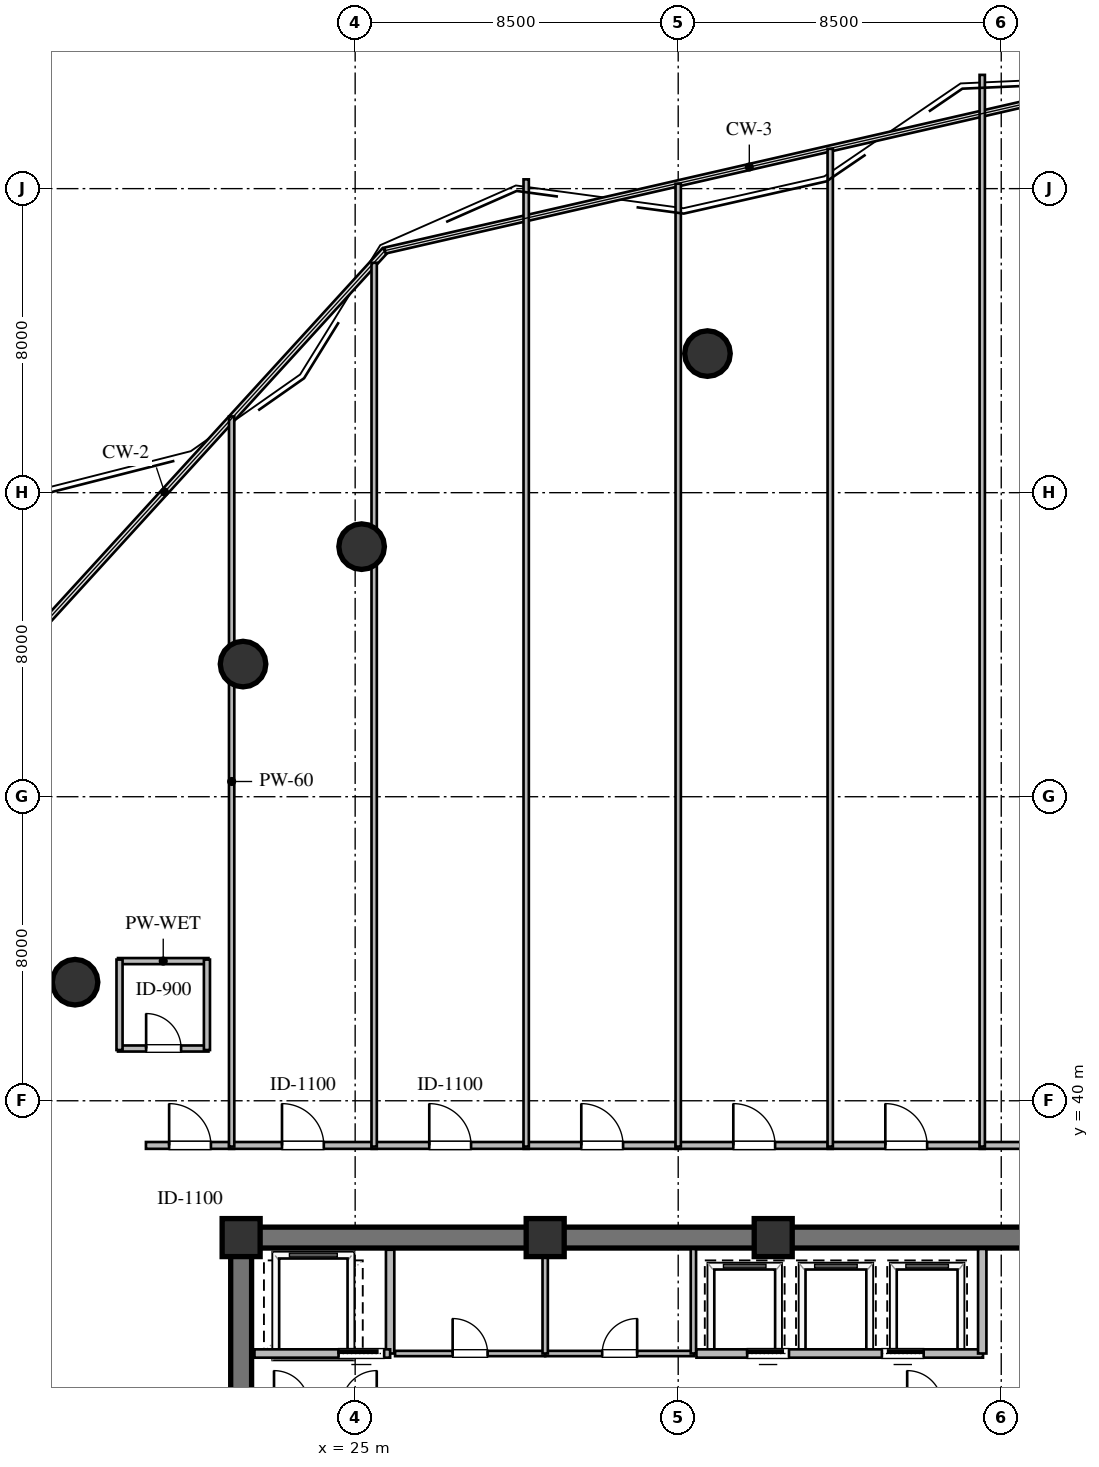
"""IFC4 building model, lengths in metres.
Left out: names, types, materials, properties, quantities, classifications, styles, units other than length and angle.
Written with IfcOpenShell. Run it as: python <this file> out.ifc"""

import sys

from ifc_helpers import new_model, si_unit, direction, frame, frame_2d, origin, origin_2d, place, context, subcontext, project, spatial, rectangle, circle, extrude, element, fill, save


model = new_model("IFC4")
c1 = context("Model", 3, precision=1e-05, world=origin(), true_north=direction((0.0, 1.0)))
c2 = subcontext(c1, "Body", "Model", "MODEL_VIEW")
j1 = project(units=[si_unit("LENGTHUNIT", "METRE"), si_unit("PLANEANGLEUNIT", "RADIAN")], contexts=[c1])
p1 = place(None, origin())
s1 = spatial("IfcSite", under=j1, at=p1, CompositionType="ELEMENT")
p2 = place(p1, origin())
s2 = spatial("IfcBuilding", under=s1, at=p2, CompositionType="ELEMENT")
p3 = place(p2, frame((0.0, 0.0, 167.4)))
s3 = spatial("IfcBuildingStorey", under=s2, at=p3, CompositionType="ELEMENT", Elevation=167.4)
p4 = place(p3, frame((21.725, 36.4, 0.0), z_axis=(0.0, 0.0, 1.0), x_axis=(1.0, 0.0, 0.0)))
e1 = element("IfcWall", 1, at=p4, inside=s3, PredefinedType="SHEAR", context=c2, shape_type="SweptSolid", body=[
    extrude(rectangle(XDim=22.55, YDim=0.55, at=frame_2d((11.275, 0.0))), origin(), (0.0, 0.0, 1.0), 3.36),
])
p5 = place(p3, frame((22.0, 23.875, 0.0), z_axis=(0.0, 0.0, 1.0), x_axis=(0.0, 1.0, 0.0)))
e2 = element("IfcWall", 2, at=p5, inside=s3, PredefinedType="SHEAR", context=c2, shape_type="SweptSolid", body=[
    extrude(rectangle(XDim=12.25, YDim=0.55, at=frame_2d((6.125, 0.0))), origin(), (0.0, 0.0, 1.0), 3.36),
])
for number, where, z_axis, x_axis in (
    (3, (36.0, 36.4, 0.0), (0.0, 0.0, 1.0), (1.0, 0.0, 0.0)),
    (4, (30.0, 36.4, 0.0), (0.0, 0.0, 1.0), (1.0, 0.0, 0.0)),
    (5, (22.0, 36.4, 0.0), (0.0, 0.0, 1.0), (1.0, 0.0, 0.0)),
):
    element("IfcColumn", number, at=place(p3, frame(where, z_axis=z_axis, x_axis=x_axis)), inside=s3, PredefinedType="COLUMN", context=c2, shape_type="SweptSolid", body=[
        extrude(rectangle(XDim=1.0, YDim=1.0, at=origin_2d()), origin(), (0.0, 0.0, 1.0), 3.6),
    ])
for number, where, z_axis, x_axis in (
    (6, (34.27, 59.66, 0.0), (0.0, 0.0, 1.0), (1.0, 0.0, 0.0)),
    (7, (25.17, 54.58, 0.0), (0.0, 0.0, 1.0), (1.0, 0.0, 0.0)),
    (8, (22.05, 51.49, 0.0), (0.0, 0.0, 1.0), (1.0, 0.0, 0.0)),
    (9, (17.63, 43.12, 0.0), (0.0, 0.0, 1.0), (1.0, 0.0, 0.0)),
):
    element("IfcColumn", number, at=place(p3, frame(where, z_axis=z_axis, x_axis=x_axis)), inside=s3, PredefinedType="COLUMN", context=c2, shape_type="SweptSolid", body=[
        extrude(circle(Radius=0.6, at=origin_2d()), origin(), (0.0, 0.0, 1.0), 3.6),
    ])
p6 = place(p3, frame((25.92, 33.35, 0.0), z_axis=(0.0, 0.0, 1.0), x_axis=(0.0, 1.0, 0.0)))
e10 = element("IfcWall", 10, at=p6, inside=s3, PredefinedType="SOLIDWALL", context=c2, shape_type="SweptSolid", body=[
    extrude(rectangle(XDim=2.73, YDim=0.22, at=frame_2d((1.365, 0.0))), origin(), (0.0, 0.0, 1.0), 3.36),
])
p7 = place(p3, frame((22.35, 33.35, 0.0), z_axis=(0.0, 0.0, 1.0), x_axis=(1.0, 0.0, 0.0)))
e11 = element("IfcWall", 11, at=p7, inside=s3, PredefinedType="SOLIDWALL", context=c2, shape_type="SweptSolid", body=[
    extrude(rectangle(XDim=3.57, YDim=0.22, at=frame_2d((1.785, 0.0))), origin(), (0.0, 0.0, 1.0), 3.36),
])
p8 = place(p7, frame((2.213, 0.0, 0.0)))
e12 = element("IfcOpeningElement", 12, at=p8, cuts=e11, PredefinedType="OPENING", context=c2, shape_type="SweptSolid", body=[
    extrude(rectangle(XDim=1.2, YDim=2.1, at=frame_2d((0.6, 1.05))), frame((0.0, 0.12, 0.0), z_axis=(0.0, -1.0, 0.0), x_axis=(1.0, 0.0, 0.0)), (0.0, 0.0, 1.0), 0.24),
])
p9 = place(p3, frame((26.05, 33.35, 0.0), z_axis=(0.0, 0.0, 1.0), x_axis=(1.0, 0.0, 0.0)))
e13 = element("IfcWall", 13, at=p9, inside=s3, PredefinedType="PARTITIONING", context=c2, shape_type="SweptSolid", body=[
    extrude(rectangle(XDim=3.95, YDim=0.14, at=frame_2d((1.975, 0.0))), origin(), (0.0, 0.0, 1.0), 3.36),
])
p10 = place(p9, frame((1.515, 0.0, 0.0)))
e14 = element("IfcOpeningElement", 14, at=p10, cuts=e13, PredefinedType="OPENING", context=c2, shape_type="SweptSolid", body=[
    extrude(rectangle(XDim=0.92, YDim=2.1, at=frame_2d((0.46, 1.05))), frame((0.0, 0.08, 0.0), z_axis=(0.0, -1.0, 0.0), x_axis=(1.0, 0.0, 0.0)), (0.0, 0.0, 1.0), 0.16),
])
p11 = place(p3, frame((30.0, 33.35, 0.0), z_axis=(0.0, 0.0, 1.0), x_axis=(1.0, 0.0, 0.0)))
e15 = element("IfcWall", 15, at=p11, inside=s3, PredefinedType="PARTITIONING", context=c2, shape_type="SweptSolid", body=[
    extrude(rectangle(XDim=3.92, YDim=0.14, at=frame_2d((1.96, 0.0))), origin(), (0.0, 0.0, 1.0), 3.36),
])
p12 = place(p11, frame((1.5, 0.0, 0.0)))
e16 = element("IfcOpeningElement", 16, at=p12, cuts=e15, PredefinedType="OPENING", context=c2, shape_type="SweptSolid", body=[
    extrude(rectangle(XDim=0.92, YDim=2.1, at=frame_2d((0.46, 1.05))), frame((0.0, 0.08, 0.0), z_axis=(0.0, -1.0, 0.0), x_axis=(1.0, 0.0, 0.0)), (0.0, 0.0, 1.0), 0.16),
])
for number, where, z_axis, x_axis in (
    (17, (30.0, 33.35, 0.0), (0.0, 0.0, 1.0), (0.0, 1.0, 0.0)),
    (18, (33.9, 33.35, 0.0), (0.0, 0.0, 1.0), (0.0, 1.0, 0.0)),
):
    element("IfcWall", number, at=place(p3, frame(where, z_axis=z_axis, x_axis=x_axis)), inside=s3, PredefinedType="PARTITIONING", context=c2, shape_type="SweptSolid", body=[
        extrude(rectangle(XDim=2.75, YDim=0.14, at=frame_2d((1.375, 0.0))), origin(), (0.0, 0.0, 1.0), 3.36),
    ])
p13 = place(p3, frame((33.98, 33.35, 0.0), z_axis=(0.0, 0.0, 1.0), x_axis=(1.0, 0.0, 0.0)))
e19 = element("IfcWall", 19, at=p13, inside=s3, PredefinedType="SOLIDWALL", context=c2, shape_type="SweptSolid", body=[
    extrude(rectangle(XDim=7.54, YDim=0.22, at=frame_2d((3.77, 0.0))), origin(), (0.0, 0.0, 1.0), 3.36),
])
p14 = place(p13, frame((1.335, 0.0, 0.0)))
e20 = element("IfcOpeningElement", 20, at=p14, cuts=e19, PredefinedType="OPENING", context=c2, shape_type="SweptSolid", body=[
    extrude(rectangle(XDim=1.1, YDim=2.1, at=frame_2d((0.55, 1.05))), frame((0.0, 0.12, 0.0), z_axis=(0.0, -1.0, 0.0), x_axis=(1.0, 0.0, 0.0)), (0.0, 0.0, 1.0), 0.24),
])
p15 = place(p13, frame((4.879, 0.0, 0.0)))
e21 = element("IfcOpeningElement", 21, at=p15, cuts=e19, PredefinedType="OPENING", context=c2, shape_type="SweptSolid", body=[
    extrude(rectangle(XDim=1.1, YDim=2.1, at=frame_2d((0.55, 1.05))), frame((0.0, 0.12, 0.0), z_axis=(0.0, -1.0, 0.0), x_axis=(1.0, 0.0, 0.0)), (0.0, 0.0, 1.0), 0.24),
])
p16 = place(p3, frame((41.5, 33.35, 0.0), z_axis=(0.0, 0.0, 1.0), x_axis=(0.0, 1.0, 0.0)))
e22 = element("IfcWall", 22, at=p16, inside=s3, PredefinedType="SOLIDWALL", context=c2, shape_type="SweptSolid", body=[
    extrude(rectangle(XDim=2.75, YDim=0.22, at=frame_2d((1.375, 0.0))), origin(), (0.0, 0.0, 1.0), 3.36),
])
p17 = place(p3, frame((18.76, 41.375, 0.0), z_axis=(0.0, 0.0, 1.0), x_axis=(1.0, 0.0, 0.0)))
e23 = element("IfcWall", 23, at=p17, inside=s3, PredefinedType="PLUMBINGWALL", context=c2, shape_type="SweptSolid", body=[
    extrude(rectangle(XDim=2.38, YDim=0.16, at=frame_2d((1.19, 0.0))), origin(), (0.0, 0.0, 1.0), 3.36),
])
p18 = place(p17, frame((0.74, 0.0, 0.0)))
e24 = element("IfcOpeningElement", 24, at=p18, cuts=e23, PredefinedType="OPENING", context=c2, shape_type="SweptSolid", body=[
    extrude(rectangle(XDim=0.92, YDim=2.1, at=frame_2d((0.46, 1.05))), frame((0.0, 0.09, 0.0), z_axis=(0.0, -1.0, 0.0), x_axis=(1.0, 0.0, 0.0)), (0.0, 0.0, 1.0), 0.18),
])
p19 = place(p3, frame((18.76, 43.675, 0.0), z_axis=(0.0, 0.0, 1.0), x_axis=(1.0, 0.0, 0.0)))
e25 = element("IfcWall", 25, at=p19, inside=s3, PredefinedType="PLUMBINGWALL", context=c2, shape_type="SweptSolid", body=[
    extrude(rectangle(XDim=2.38, YDim=0.16, at=frame_2d((1.19, 0.0))), origin(), (0.0, 0.0, 1.0), 3.36),
])
for number, where, z_axis, x_axis in (
    (26, (18.8, 41.335, 0.0), (0.0, 0.0, 1.0), (0.0, 1.0, 0.0)),
    (27, (21.1, 41.335, 0.0), (0.0, 0.0, 1.0), (0.0, 1.0, 0.0)),
):
    element("IfcWall", number, at=place(p3, frame(where, z_axis=z_axis, x_axis=x_axis)), inside=s3, PredefinedType="PLUMBINGWALL", context=c2, shape_type="SweptSolid", body=[
        extrude(rectangle(XDim=2.38, YDim=0.16, at=frame_2d((1.19, 0.0))), origin(), (0.0, 0.0, 1.0), 3.36),
    ])
p20 = place(p3, frame((19.495, 38.825, 0.0), z_axis=(0.0, 0.0, 1.0), x_axis=(1.0, 0.0, 0.0)))
e28 = element("IfcWall", 28, at=p20, inside=s3, PredefinedType="PARTITIONING", context=c2, shape_type="SweptSolid", body=[
    extrude(rectangle(XDim=2.32, YDim=0.18, at=frame_2d((1.16, 0.0))), origin(), (0.0, 0.0, 1.0), 3.36),
])
p21 = place(p20, frame((0.61, 0.0, 0.0)))
e29 = element("IfcOpeningElement", 29, at=p21, cuts=e28, PredefinedType="OPENING", context=c2, shape_type="SweptSolid", body=[
    extrude(rectangle(XDim=1.1, YDim=2.1, at=frame_2d((0.55, 1.05))), frame((0.0, 0.1, 0.0), z_axis=(0.0, -1.0, 0.0), x_axis=(1.0, 0.0, 0.0)), (0.0, 0.0, 1.0), 0.2),
])
p22 = place(p3, frame((21.685, 38.825, 0.0), z_axis=(0.0, 0.0, 1.0), x_axis=(1.0, 0.0, 0.0)))
e30 = element("IfcWall", 30, at=p22, inside=s3, PredefinedType="PARTITIONING", context=c2, shape_type="SweptSolid", body=[
    extrude(rectangle(XDim=3.88, YDim=0.18, at=frame_2d((1.94, 0.0))), origin(), (0.0, 0.0, 1.0), 3.36),
])
p23 = place(p22, frame((1.39, 0.0, 0.0)))
e31 = element("IfcOpeningElement", 31, at=p23, cuts=e30, PredefinedType="OPENING", context=c2, shape_type="SweptSolid", body=[
    extrude(rectangle(XDim=1.1, YDim=2.1, at=frame_2d((0.55, 1.05))), frame((0.0, 0.1, 0.0), z_axis=(0.0, -1.0, 0.0), x_axis=(1.0, 0.0, 0.0)), (0.0, 0.0, 1.0), 0.2),
])
p24 = place(p3, frame((25.435, 38.825, 0.0), z_axis=(0.0, 0.0, 1.0), x_axis=(1.0, 0.0, 0.0)))
e32 = element("IfcWall", 32, at=p24, inside=s3, PredefinedType="PARTITIONING", context=c2, shape_type="SweptSolid", body=[
    extrude(rectangle(XDim=4.13, YDim=0.18, at=frame_2d((2.065, 0.0))), origin(), (0.0, 0.0, 1.0), 3.36),
])
p25 = place(p24, frame((1.515, 0.0, 0.0)))
e33 = element("IfcOpeningElement", 33, at=p25, cuts=e32, PredefinedType="OPENING", context=c2, shape_type="SweptSolid", body=[
    extrude(rectangle(XDim=1.1, YDim=2.1, at=frame_2d((0.55, 1.05))), frame((0.0, 0.1, 0.0), z_axis=(0.0, -1.0, 0.0), x_axis=(1.0, 0.0, 0.0)), (0.0, 0.0, 1.0), 0.2),
])
p26 = place(p3, frame((29.435, 38.825, 0.0), z_axis=(0.0, 0.0, 1.0), x_axis=(1.0, 0.0, 0.0)))
e34 = element("IfcWall", 34, at=p26, inside=s3, PredefinedType="PARTITIONING", context=c2, shape_type="SweptSolid", body=[
    extrude(rectangle(XDim=4.13, YDim=0.18, at=frame_2d((2.065, 0.0))), origin(), (0.0, 0.0, 1.0), 3.36),
])
p27 = place(p26, frame((1.515, 0.0, 0.0)))
e35 = element("IfcOpeningElement", 35, at=p27, cuts=e34, PredefinedType="OPENING", context=c2, shape_type="SweptSolid", body=[
    extrude(rectangle(XDim=1.1, YDim=2.1, at=frame_2d((0.55, 1.05))), frame((0.0, 0.1, 0.0), z_axis=(0.0, -1.0, 0.0), x_axis=(1.0, 0.0, 0.0)), (0.0, 0.0, 1.0), 0.2),
])
p28 = place(p3, frame((33.435, 38.825, 0.0), z_axis=(0.0, 0.0, 1.0), x_axis=(1.0, 0.0, 0.0)))
e36 = element("IfcWall", 36, at=p28, inside=s3, PredefinedType="PARTITIONING", context=c2, shape_type="SweptSolid", body=[
    extrude(rectangle(XDim=4.13, YDim=0.18, at=frame_2d((2.065, 0.0))), origin(), (0.0, 0.0, 1.0), 3.36),
])
p29 = place(p28, frame((1.515, 0.0, 0.0)))
e37 = element("IfcOpeningElement", 37, at=p29, cuts=e36, PredefinedType="OPENING", context=c2, shape_type="SweptSolid", body=[
    extrude(rectangle(XDim=1.1, YDim=2.1, at=frame_2d((0.55, 1.05))), frame((0.0, 0.1, 0.0), z_axis=(0.0, -1.0, 0.0), x_axis=(1.0, 0.0, 0.0)), (0.0, 0.0, 1.0), 0.2),
])
p30 = place(p3, frame((37.435, 38.825, 0.0), z_axis=(0.0, 0.0, 1.0), x_axis=(1.0, 0.0, 0.0)))
e38 = element("IfcWall", 38, at=p30, inside=s3, PredefinedType="PARTITIONING", context=c2, shape_type="SweptSolid", body=[
    extrude(rectangle(XDim=4.13, YDim=0.18, at=frame_2d((2.065, 0.0))), origin(), (0.0, 0.0, 1.0), 3.36),
])
p31 = place(p30, frame((1.515, 0.0, 0.0)))
e39 = element("IfcOpeningElement", 39, at=p31, cuts=e38, PredefinedType="OPENING", context=c2, shape_type="SweptSolid", body=[
    extrude(rectangle(XDim=1.1, YDim=2.1, at=frame_2d((0.55, 1.05))), frame((0.0, 0.1, 0.0), z_axis=(0.0, -1.0, 0.0), x_axis=(1.0, 0.0, 0.0)), (0.0, 0.0, 1.0), 0.2),
])
p32 = place(p3, frame((41.435, 38.825, 0.0), z_axis=(0.0, 0.0, 1.0), x_axis=(1.0, 0.0, 0.0)))
e40 = element("IfcWall", 40, at=p32, inside=s3, PredefinedType="PARTITIONING", context=c2, shape_type="SweptSolid", body=[
    extrude(rectangle(XDim=4.38, YDim=0.18, at=frame_2d((2.19, 0.0))), origin(), (0.0, 0.0, 1.0), 3.36),
])
p33 = place(p32, frame((1.64, 0.0, 0.0)))
e41 = element("IfcOpeningElement", 41, at=p33, cuts=e40, PredefinedType="OPENING", context=c2, shape_type="SweptSolid", body=[
    extrude(rectangle(XDim=1.1, YDim=2.1, at=frame_2d((0.55, 1.05))), frame((0.0, 0.1, 0.0), z_axis=(0.0, -1.0, 0.0), x_axis=(1.0, 0.0, 0.0)), (0.0, 0.0, 1.0), 0.2),
])
p34 = place(p3, frame((21.75, 58.006, 0.0), z_axis=(0.0, 0.0, 1.0), x_axis=(0.0, -1.0, 0.0)))
e42 = element("IfcWall", 42, at=p34, inside=s3, PredefinedType="PARTITIONING", context=c2, shape_type="SweptSolid", body=[
    extrude(rectangle(XDim=19.211, YDim=0.14, at=frame_2d((9.605, 0.0))), origin(), (0.0, 0.0, 1.0), 2.806),
])
p35 = place(p3, frame((25.5, 62.049, 0.0), z_axis=(0.0, 0.0, 1.0), x_axis=(0.0, -1.0, 0.0)))
e43 = element("IfcWall", 43, at=p35, inside=s3, PredefinedType="PARTITIONING", context=c2, shape_type="SweptSolid", body=[
    extrude(rectangle(XDim=23.254, YDim=0.14, at=frame_2d((11.627, 0.0))), origin(), (0.0, 0.0, 1.0), 2.806),
])
p36 = place(p3, frame((29.5, 64.244, 0.0), z_axis=(0.0, 0.0, 1.0), x_axis=(0.0, -1.0, 0.0)))
e44 = element("IfcWall", 44, at=p36, inside=s3, PredefinedType="PARTITIONING", context=c2, shape_type="SweptSolid", body=[
    extrude(rectangle(XDim=25.449, YDim=0.14, at=frame_2d((12.725, 0.0))), origin(), (0.0, 0.0, 1.0), 3.36),
])
p37 = place(p3, frame((33.5, 64.13, 0.0), z_axis=(0.0, 0.0, 1.0), x_axis=(0.0, -1.0, 0.0)))
e45 = element("IfcWall", 45, at=p37, inside=s3, PredefinedType="PARTITIONING", context=c2, shape_type="SweptSolid", body=[
    extrude(rectangle(XDim=25.335, YDim=0.14, at=frame_2d((12.667, 0.0))), origin(), (0.0, 0.0, 1.0), 3.36),
])
p38 = place(p3, frame((37.5, 65.047, 0.0), z_axis=(0.0, 0.0, 1.0), x_axis=(0.0, -1.0, 0.0)))
e46 = element("IfcWall", 46, at=p38, inside=s3, PredefinedType="PARTITIONING", context=c2, shape_type="SweptSolid", body=[
    extrude(rectangle(XDim=26.252, YDim=0.14, at=frame_2d((13.126, 0.0))), origin(), (0.0, 0.0, 1.0), 3.36),
])
p39 = place(p3, frame((41.5, 66.993, 0.0), z_axis=(0.0, 0.0, 1.0), x_axis=(0.0, -1.0, 0.0)))
e47 = element("IfcWall", 47, at=p39, inside=s3, PredefinedType="PARTITIONING", context=c2, shape_type="SweptSolid", body=[
    extrude(rectangle(XDim=28.198, YDim=0.14, at=frame_2d((14.099, 0.0))), origin(), (0.0, 0.0, 1.0), 3.36),
])
p40 = place(p8, origin())
e48 = element("IfcDoor", 48, at=p40, inside=s3, OperationType="SLIDING_TO_LEFT", PredefinedType="DOOR", context=c2, shape_type="SweptSolid", body=[
    extrude(rectangle(XDim=1.2, YDim=2.1, at=frame_2d((0.6, 1.05))), frame((0.0, 0.025, 0.0), z_axis=(0.0, -1.0, 0.0), x_axis=(1.0, 0.0, 0.0)), (0.0, 0.0, 1.0), 0.05),
])
fill(e12, e48)
p41 = place(p10, origin())
e49 = element("IfcDoor", 49, at=p41, inside=s3, OperationType="SINGLE_SWING_LEFT", PredefinedType="DOOR", context=c2, shape_type="SweptSolid", body=[
    extrude(rectangle(XDim=0.92, YDim=2.1, at=frame_2d((0.46, 1.05))), frame((0.0, 0.025, 0.0), z_axis=(0.0, -1.0, 0.0), x_axis=(1.0, 0.0, 0.0)), (0.0, 0.0, 1.0), 0.05),
])
fill(e14, e49)
p42 = place(p12, origin())
e50 = element("IfcDoor", 50, at=p42, inside=s3, OperationType="SINGLE_SWING_RIGHT", PredefinedType="DOOR", context=c2, shape_type="SweptSolid", body=[
    extrude(rectangle(XDim=0.92, YDim=2.1, at=frame_2d((0.46, 1.05))), frame((0.0, 0.025, 0.0), z_axis=(0.0, -1.0, 0.0), x_axis=(1.0, 0.0, 0.0)), (0.0, 0.0, 1.0), 0.05),
])
fill(e16, e50)
p43 = place(p14, origin())
e51 = element("IfcDoor", 51, at=p43, inside=s3, OperationType="SLIDING_TO_LEFT", PredefinedType="DOOR", context=c2, shape_type="SweptSolid", body=[
    extrude(rectangle(XDim=1.1, YDim=2.1, at=frame_2d((0.55, 1.05))), frame((0.0, 0.025, 0.0), z_axis=(0.0, -1.0, 0.0), x_axis=(1.0, 0.0, 0.0)), (0.0, 0.0, 1.0), 0.05),
])
fill(e20, e51)
p44 = place(p15, origin())
e52 = element("IfcDoor", 52, at=p44, inside=s3, OperationType="SLIDING_TO_RIGHT", PredefinedType="DOOR", context=c2, shape_type="SweptSolid", body=[
    extrude(rectangle(XDim=1.1, YDim=2.1, at=frame_2d((0.55, 1.05))), frame((0.0, 0.025, 0.0), z_axis=(0.0, -1.0, 0.0), x_axis=(1.0, 0.0, 0.0)), (0.0, 0.0, 1.0), 0.05),
])
fill(e21, e52)
p45 = place(p18, origin())
e53 = element("IfcDoor", 53, at=p45, inside=s3, OperationType="SINGLE_SWING_LEFT", PredefinedType="DOOR", context=c2, shape_type="SweptSolid", body=[
    extrude(rectangle(XDim=0.92, YDim=2.1, at=frame_2d((0.46, 1.05))), frame((0.0, 0.025, 0.0), z_axis=(0.0, -1.0, 0.0), x_axis=(1.0, 0.0, 0.0)), (0.0, 0.0, 1.0), 0.05),
])
fill(e24, e53)
p46 = place(p21, origin())
e54 = element("IfcDoor", 54, at=p46, inside=s3, OperationType="SINGLE_SWING_LEFT", PredefinedType="DOOR", context=c2, shape_type="SweptSolid", body=[
    extrude(rectangle(XDim=1.1, YDim=2.1, at=frame_2d((0.55, 1.05))), frame((0.0, 0.025, 0.0), z_axis=(0.0, -1.0, 0.0), x_axis=(1.0, 0.0, 0.0)), (0.0, 0.0, 1.0), 0.05),
])
fill(e29, e54)
p47 = place(p23, origin())
e55 = element("IfcDoor", 55, at=p47, inside=s3, OperationType="SINGLE_SWING_LEFT", PredefinedType="DOOR", context=c2, shape_type="SweptSolid", body=[
    extrude(rectangle(XDim=1.1, YDim=2.1, at=frame_2d((0.55, 1.05))), frame((0.0, 0.025, 0.0), z_axis=(0.0, -1.0, 0.0), x_axis=(1.0, 0.0, 0.0)), (0.0, 0.0, 1.0), 0.05),
])
fill(e31, e55)
p48 = place(p25, origin())
e56 = element("IfcDoor", 56, at=p48, inside=s3, OperationType="SINGLE_SWING_LEFT", PredefinedType="DOOR", context=c2, shape_type="SweptSolid", body=[
    extrude(rectangle(XDim=1.1, YDim=2.1, at=frame_2d((0.55, 1.05))), frame((0.0, 0.025, 0.0), z_axis=(0.0, -1.0, 0.0), x_axis=(1.0, 0.0, 0.0)), (0.0, 0.0, 1.0), 0.05),
])
fill(e33, e56)
p49 = place(p27, origin())
e57 = element("IfcDoor", 57, at=p49, inside=s3, OperationType="SINGLE_SWING_LEFT", PredefinedType="DOOR", context=c2, shape_type="SweptSolid", body=[
    extrude(rectangle(XDim=1.1, YDim=2.1, at=frame_2d((0.55, 1.05))), frame((0.0, 0.025, 0.0), z_axis=(0.0, -1.0, 0.0), x_axis=(1.0, 0.0, 0.0)), (0.0, 0.0, 1.0), 0.05),
])
fill(e35, e57)
p50 = place(p29, origin())
e58 = element("IfcDoor", 58, at=p50, inside=s3, OperationType="SINGLE_SWING_LEFT", PredefinedType="DOOR", context=c2, shape_type="SweptSolid", body=[
    extrude(rectangle(XDim=1.1, YDim=2.1, at=frame_2d((0.55, 1.05))), frame((0.0, 0.025, 0.0), z_axis=(0.0, -1.0, 0.0), x_axis=(1.0, 0.0, 0.0)), (0.0, 0.0, 1.0), 0.05),
])
fill(e37, e58)
p51 = place(p31, origin())
e59 = element("IfcDoor", 59, at=p51, inside=s3, OperationType="SINGLE_SWING_LEFT", PredefinedType="DOOR", context=c2, shape_type="SweptSolid", body=[
    extrude(rectangle(XDim=1.1, YDim=2.1, at=frame_2d((0.55, 1.05))), frame((0.0, 0.025, 0.0), z_axis=(0.0, -1.0, 0.0), x_axis=(1.0, 0.0, 0.0)), (0.0, 0.0, 1.0), 0.05),
])
fill(e39, e59)
save(model, sys.argv[1])
